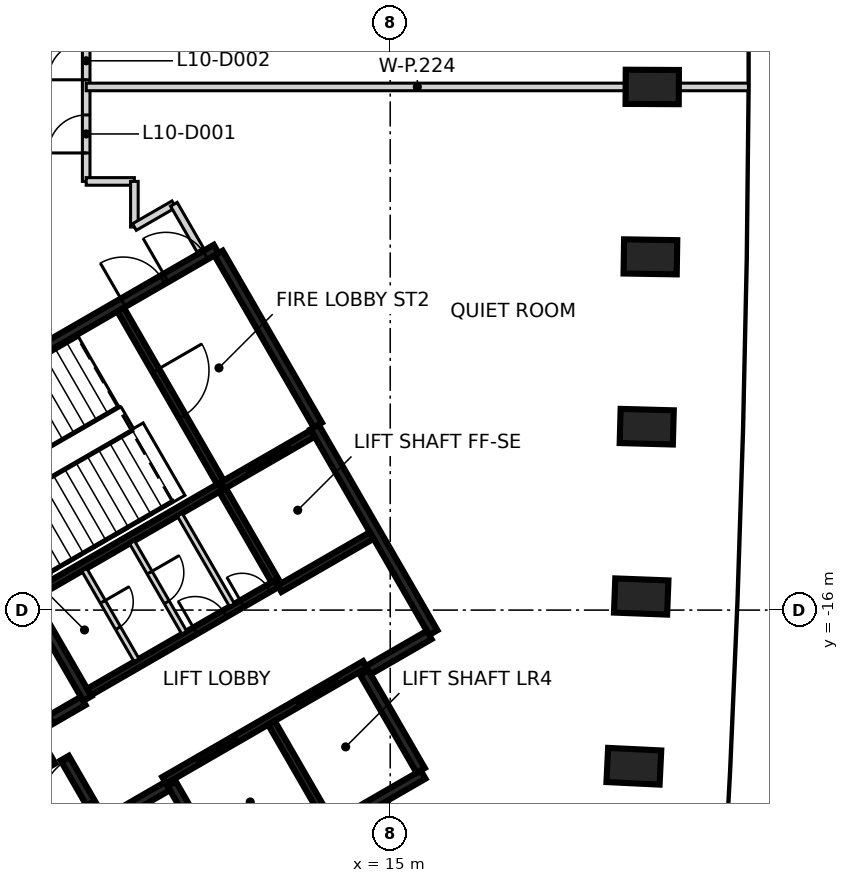
"""IFC4 building model, lengths in metres.
Left out: names, types, materials, properties, quantities, classifications, styles, units other than length and angle.
Written with IfcOpenShell. Run it as: python <this file> out.ifc"""

import sys

from ifc_helpers import new_model, si_unit, direction, frame, frame_2d, origin, origin_2d, place, context, subcontext, project, spatial, rectangle, extrude, element, fill, save


model = new_model("IFC4")
c1 = context("Model", 3, precision=1e-05, world=origin(), true_north=direction((0.0, 1.0)))
c2 = subcontext(c1, "Body", "Model", "MODEL_VIEW")
j1 = project(units=[si_unit("LENGTHUNIT", "METRE"), si_unit("PLANEANGLEUNIT", "RADIAN")], contexts=[c1])
p1 = place(None, origin())
s1 = spatial("IfcSite", under=j1, at=p1, CompositionType="ELEMENT")
p2 = place(p1, origin())
s2 = spatial("IfcBuilding", under=s1, at=p2, CompositionType="ELEMENT")
p3 = place(p2, frame((0.0, 0.0, 49.4)))
s3 = spatial("IfcBuildingStorey", under=s2, at=p3, CompositionType="ELEMENT", Elevation=49.4)
for number, where, z_axis, x_axis in (
    (1, (21.41, -20.109, -0.475), (0.0, 0.0, 1.0), (-0.999, 0.048, 0.0)),
    (2, (21.604, -15.643, -0.475), (0.0, 0.0, 1.0), (-0.999, 0.038, 0.0)),
    (3, (21.749, -11.174, -0.475), (0.0, 0.0, 1.0), (-1.0, 0.027, 0.0)),
    (4, (21.846, -6.706, -0.475), (0.0, 0.0, 1.0), (-1.0, 0.016, 0.0)),
    (5, (21.894, -2.235, -0.475), (0.0, 0.0, 1.0), (-1.0, 0.005, 0.0)),
):
    element("IfcColumn", number, at=place(p3, frame(where, z_axis=z_axis, x_axis=x_axis)), inside=s3, PredefinedType="COLUMN", context=c2, shape_type="SweptSolid", body=[
        extrude(rectangle(XDim=1.4, YDim=0.9, at=origin_2d()), origin(), (0.0, 0.0, 1.0), 3.6),
    ])
p4 = place(p3, frame((0.417, -12.273, 0.0), z_axis=(0.0, 0.0, 1.0), x_axis=(0.866021906294, 0.500006057782, 0.0)))
e6 = element("IfcWall", 6, at=p4, inside=s3, PredefinedType="SHEAR", context=c2, shape_type="SweptSolid", body=[
    extrude(rectangle(XDim=11.55, YDim=0.25, at=frame_2d((5.775, 0.0))), origin(), (0.0, 0.0, 1.0), 3.125),
])
p5 = place(p4, frame((10.025, 0.0, 0.0)))
e7 = element("IfcOpeningElement", 7, at=p5, cuts=e6, PredefinedType="OPENING", context=c2, shape_type="SweptSolid", body=[
    extrude(rectangle(XDim=1.2, YDim=2.1, at=frame_2d((0.6, 1.05))), frame((0.0, 0.135, 0.0), z_axis=(0.0, -1.0, 0.0), x_axis=(1.0, 0.0, 0.0)), (0.0, 0.0, 1.0), 0.27),
])
p6 = place(p4, frame((8.725, 0.0, 0.0)))
e8 = element("IfcOpeningElement", 8, at=p6, cuts=e6, PredefinedType="OPENING", context=c2, shape_type="SweptSolid", body=[
    extrude(rectangle(XDim=1.2, YDim=2.1, at=frame_2d((0.6, 1.05))), frame((0.0, 0.135, 0.0), z_axis=(0.0, -1.0, 0.0), x_axis=(1.0, 0.0, 0.0)), (0.0, 0.0, 1.0), 0.27),
])
p7 = place(p3, frame((13.008, -11.181, 0.0), z_axis=(0.0, 0.0, 1.0), x_axis=(0.500004234368, -0.866022959057, 0.0)))
e9 = element("IfcWall", 9, at=p7, inside=s3, PredefinedType="SHEAR", context=c2, shape_type="SweptSolid", body=[
    extrude(rectangle(XDim=6.25, YDim=0.25, at=frame_2d((3.125, 0.0))), origin(), (0.0, 0.0, 1.0), 3.125),
])
p8 = place(p3, frame((15.865, -20.328, 0.0), z_axis=(0.0, 0.0, 1.0), x_axis=(-0.86602852612, -0.499994591916, 0.0)))
e10 = element("IfcWall", 10, at=p8, inside=s3, PredefinedType="SHEAR", context=c2, shape_type="SweptSolid", body=[
    extrude(rectangle(XDim=5.85, YDim=0.25, at=frame_2d((2.925, 0.0))), origin(), (0.0, 0.0, 1.0), 3.125),
])
p9 = place(p3, frame((10.483, -6.606, 0.0), z_axis=(0.0, 0.0, 1.0), x_axis=(0.49999885962, -0.866026062182, 0.0)))
e11 = element("IfcWall", 11, at=p9, inside=s3, PredefinedType="SHEAR", context=c2, shape_type="SweptSolid", body=[
    extrude(rectangle(XDim=5.225, YDim=0.25, at=frame_2d((2.612, 0.0))), origin(), (0.0, 0.0, 1.0), 3.125),
])
p10 = place(p3, frame((7.031, -18.327, 0.0), z_axis=(0.0, 0.0, 1.0), x_axis=(-0.499971222258, 0.866042017984, 0.0)))
e12 = element("IfcWall", 12, at=p10, inside=s3, PredefinedType="SHEAR", context=c2, shape_type="SweptSolid", body=[
    extrude(rectangle(XDim=3.2, YDim=0.25, at=frame_2d((1.6, 0.0))), origin(), (0.0, 0.0, 1.0), 3.125),
])
for number, where, z_axis, x_axis in (
    (13, (14.315, -17.644, 0.0), (0.0, 0.0, 1.0), (0.5, -0.866, 0.0)),
    (14, (10.736, -23.145, 0.0), (0.0, 0.0, 1.0), (-0.5, 0.866, 0.0)),
):
    element("IfcWall", number, at=place(p3, frame(where, z_axis=z_axis, x_axis=x_axis)), inside=s3, PredefinedType="SHEAR", context=c2, shape_type="SweptSolid", body=[
        extrude(rectangle(XDim=2.974, YDim=0.25, at=frame_2d((1.487, 0.0))), origin(), (0.0, 0.0, 1.0), 3.125),
    ])
p11 = place(p3, frame((9.14, -20.631, 0.0), z_axis=(0.0, 0.0, 1.0), x_axis=(-0.866043531843, -0.499968599967, 0.0)))
e15 = element("IfcWall", 15, at=p11, inside=s3, PredefinedType="SHEAR", context=c2, shape_type="SweptSolid", body=[
    extrude(rectangle(XDim=1.975, YDim=0.25, at=frame_2d((0.987, 0.0))), origin(), (0.0, 0.0, 1.0), 3.125),
])
p12 = place(p3, frame((16.025, -16.656, 0.0), z_axis=(0.0, 0.0, 1.0), x_axis=(-0.866016279763, -0.500015802937, 0.0)))
e16 = element("IfcWall", 16, at=p12, inside=s3, PredefinedType="SHEAR", context=c2, shape_type="SweptSolid", body=[
    extrude(rectangle(XDim=1.849, YDim=0.25, at=frame_2d((0.925, 0.0))), origin(), (0.0, 0.0, 1.0), 3.125),
])
p13 = place(p3, frame((7.367, -21.51, 0.0), z_axis=(0.0, 0.0, 1.0), x_axis=(-0.499983108224, 0.866035156036, 0.0)))
e17 = element("IfcWall", 17, at=p13, inside=s3, PredefinedType="SHEAR", context=c2, shape_type="SweptSolid", body=[
    extrude(rectangle(XDim=1.865, YDim=0.25, at=frame_2d((0.932, 0.0))), origin(), (0.0, 0.0, 1.0), 3.125),
])
p14 = place(p13, frame((0.535, 0.0, 0.0)))
e18 = element("IfcOpeningElement", 18, at=p14, cuts=e17, PredefinedType="OPENING", context=c2, shape_type="SweptSolid", body=[
    extrude(rectangle(XDim=1.25, YDim=2.1, at=frame_2d((0.625, 1.05))), frame((0.0, 0.135, 0.0), z_axis=(0.0, -1.0, 0.0), x_axis=(1.0, 0.0, 0.0)), (0.0, 0.0, 1.0), 0.27),
])
p15 = place(p3, frame((6.065, -18.885, 0.0), z_axis=(0.0, 0.0, 1.0), x_axis=(0.866017078145, 0.500014420154, 0.0)))
e19 = element("IfcWall", 19, at=p15, inside=s3, PredefinedType="SHEAR", context=c2, shape_type="SweptSolid", body=[
    extrude(rectangle(XDim=0.989, YDim=0.25, at=frame_2d((0.495, 0.0))), origin(), (0.0, 0.0, 1.0), 3.125),
])
p16 = place(p3, frame((6.08, -20.1, 0.0), z_axis=(0.0, 0.0, 1.0), x_axis=(-0.500051773299, 0.865995510393, 0.0)))
e20 = element("IfcWall", 20, at=p16, inside=s3, PredefinedType="SHEAR", context=c2, shape_type="SweptSolid", body=[
    extrude(rectangle(XDim=0.685, YDim=0.25, at=frame_2d((0.342, 0.0))), origin(), (0.0, 0.0, 1.0), 3.125),
])
p17 = place(p3, frame((9.052, -20.48, 0.0), z_axis=(0.0, 0.0, 1.0), x_axis=(0.866030299012, 0.499991521122, 0.0)))
e21 = element("IfcWall", 21, at=p17, inside=s3, PredefinedType="SHEAR", context=c2, shape_type="SweptSolid", body=[
    extrude(rectangle(XDim=6.1, YDim=0.2, at=frame_2d((3.05, 0.0))), origin(), (0.0, 0.0, 1.0), 3.125),
])
p18 = place(p17, frame((1.0, 0.0, 0.0)))
e22 = element("IfcOpeningElement", 22, at=p18, cuts=e21, PredefinedType="OPENING", context=c2, shape_type="SweptSolid", body=[
    extrude(rectangle(XDim=1.2, YDim=2.1, at=frame_2d((0.6, 1.05))), frame((0.0, 0.11, 0.0), z_axis=(0.0, -1.0, 0.0), x_axis=(1.0, 0.0, 0.0)), (0.0, 0.0, 1.0), 0.22),
])
p19 = place(p17, frame((4.05, 0.0, 0.0)))
e23 = element("IfcOpeningElement", 23, at=p19, cuts=e21, PredefinedType="OPENING", context=c2, shape_type="SweptSolid", body=[
    extrude(rectangle(XDim=1.2, YDim=2.1, at=frame_2d((0.6, 1.05))), frame((0.0, 0.11, 0.0), z_axis=(0.0, -1.0, 0.0), x_axis=(1.0, 0.0, 0.0)), (0.0, 0.0, 1.0), 0.22),
])
p20 = place(p3, frame((10.538, -12.752, 0.0), z_axis=(0.0, 0.0, 1.0), x_axis=(-0.866038630372, -0.499977090179, 0.0)))
e24 = element("IfcWall", 24, at=p20, inside=s3, PredefinedType="SHEAR", context=c2, shape_type="SweptSolid", body=[
    extrude(rectangle(XDim=5.699, YDim=0.2, at=frame_2d((2.85, 0.0))), origin(), (0.0, 0.0, 1.0), 3.125),
])
p21 = place(p3, frame((7.077, -18.156, 0.0), z_axis=(0.0, 0.0, 1.0), x_axis=(0.866038630372, 0.499977090179, 0.0)))
e25 = element("IfcWall", 25, at=p21, inside=s3, PredefinedType="SHEAR", context=c2, shape_type="SweptSolid", body=[
    extrude(rectangle(XDim=5.699, YDim=0.2, at=frame_2d((2.85, 0.0))), origin(), (0.0, 0.0, 1.0), 3.125),
])
p22 = place(p21, frame((3.224, 0.0, 0.0)))
e26 = element("IfcOpeningElement", 26, at=p22, cuts=e25, PredefinedType="OPENING", context=c2, shape_type="SweptSolid", body=[
    extrude(rectangle(XDim=0.9, YDim=2.1, at=frame_2d((0.45, 1.05))), frame((0.0, 0.11, 0.0), z_axis=(0.0, -1.0, 0.0), x_axis=(1.0, 0.0, 0.0)), (0.0, 0.0, 1.0), 0.22),
])
p23 = place(p21, frame((4.649, 0.0, 0.0)))
e27 = element("IfcOpeningElement", 27, at=p23, cuts=e25, PredefinedType="OPENING", context=c2, shape_type="SweptSolid", body=[
    extrude(rectangle(XDim=0.8, YDim=2.1, at=frame_2d((0.4, 1.05))), frame((0.0, 0.11, 0.0), z_axis=(0.0, -1.0, 0.0), x_axis=(1.0, 0.0, 0.0)), (0.0, 0.0, 1.0), 0.22),
])
p24 = place(p3, frame((7.906, -8.094, 0.0), z_axis=(0.0, 0.0, 1.0), x_axis=(0.500024287448, -0.866011380966, 0.0)))
e28 = element("IfcWall", 28, at=p24, inside=s3, PredefinedType="SHEAR", context=c2, shape_type="SweptSolid", body=[
    extrude(rectangle(XDim=5.251, YDim=0.2, at=frame_2d((2.625, 0.0))), origin(), (0.0, 0.0, 1.0), 3.125),
])
p25 = place(p24, frame((1.849, 0.0, 0.0)))
e29 = element("IfcOpeningElement", 29, at=p25, cuts=e28, PredefinedType="OPENING", context=c2, shape_type="SweptSolid", body=[
    extrude(rectangle(XDim=1.4, YDim=2.1, at=frame_2d((0.7, 1.05))), frame((0.0, 0.11, 0.0), z_axis=(0.0, -1.0, 0.0), x_axis=(1.0, 0.0, 0.0)), (0.0, 0.0, 1.0), 0.22),
])
p26 = place(p3, frame((11.875, -18.967, 0.0), z_axis=(0.0, 0.0, 1.0), x_axis=(0.49998131003, -0.866036194175, 0.0)))
e30 = element("IfcWall", 30, at=p26, inside=s3, PredefinedType="SHEAR", context=c2, shape_type="SweptSolid", body=[
    extrude(rectangle(XDim=3.048, YDim=0.2, at=frame_2d((1.524, 0.0))), origin(), (0.0, 0.0, 1.0), 3.125),
])
p27 = place(p3, frame((11.963, -15.22, 0.0), z_axis=(0.0, 0.0, 1.0), x_axis=(-0.500034990121, 0.866005201286, 0.0)))
e31 = element("IfcWall", 31, at=p27, inside=s3, PredefinedType="SHEAR", context=c2, shape_type="SweptSolid", body=[
    extrude(rectangle(XDim=2.75, YDim=0.2, at=frame_2d((1.375, 0.0))), origin(), (0.0, 0.0, 1.0), 3.125),
])
p28 = place(p3, frame((10.587, -12.723, 0.0), z_axis=(0.0, 0.0, 1.0), x_axis=(0.866037306777, 0.499979382845, 0.0)))
e32 = element("IfcWall", 32, at=p28, inside=s3, PredefinedType="SHEAR", context=c2, shape_type="SweptSolid", body=[
    extrude(rectangle(XDim=2.742, YDim=0.2, at=frame_2d((1.371, 0.0))), origin(), (0.0, 0.0, 1.0), 3.125),
])
p29 = place(p28, frame((0.743, 0.0, 0.0)))
e33 = element("IfcOpeningElement", 33, at=p29, cuts=e32, PredefinedType="OPENING", context=c2, shape_type="SweptSolid", body=[
    extrude(rectangle(XDim=1.3, YDim=2.1, at=frame_2d((0.65, 1.05))), frame((0.0, 0.11, 0.0), z_axis=(0.0, -1.0, 0.0), x_axis=(1.0, 0.0, 0.0)), (0.0, 0.0, 1.0), 0.22),
])
p30 = place(p3, frame((14.512, -14.037, 0.0), z_axis=(0.0, 0.0, 1.0), x_axis=(-0.866044696403, -0.499966582715, 0.0)))
e34 = element("IfcWall", 34, at=p30, inside=s3, PredefinedType="SHEAR", context=c2, shape_type="SweptSolid", body=[
    extrude(rectangle(XDim=2.799, YDim=0.2, at=frame_2d((1.399, 0.0))), origin(), (0.0, 0.0, 1.0), 3.125),
])
p31 = place(p3, frame((8.207, -14.214, 0.0), z_axis=(0.0, 0.0, 1.0), x_axis=(0.50002746344, -0.86600954718, 0.0)))
e35 = element("IfcWall", 35, at=p31, inside=s3, PredefinedType="PARTITIONING", context=c2, shape_type="SweptSolid", body=[
    extrude(rectangle(XDim=2.748, YDim=0.15, at=frame_2d((1.374, 0.0))), origin(), (0.0, 0.0, 1.0), 3.125),
])
p32 = place(p31, frame((0.924, 0.0, 0.0)))
e36 = element("IfcOpeningElement", 36, at=p32, cuts=e35, PredefinedType="OPENING", context=c2, shape_type="SweptSolid", body=[
    extrude(rectangle(XDim=0.9, YDim=2.1, at=frame_2d((0.45, 1.05))), frame((0.0, 0.085, 0.0), z_axis=(0.0, -1.0, 0.0), x_axis=(1.0, 0.0, 0.0)), (0.0, 0.0, 1.0), 0.17),
])
p33 = place(p3, frame((9.462, -13.489, 0.0), z_axis=(0.0, 0.0, 1.0), x_axis=(0.499988999718, -0.866031754707, 0.0)))
e37 = element("IfcWall", 37, at=p33, inside=s3, PredefinedType="PARTITIONING", context=c2, shape_type="SweptSolid", body=[
    extrude(rectangle(XDim=2.749, YDim=0.15, at=frame_2d((1.374, 0.0))), origin(), (0.0, 0.0, 1.0), 3.125),
])
p34 = place(p3, frame((6.951, -14.939, 0.0), z_axis=(0.0, 0.0, 1.0), x_axis=(0.499988999718, -0.866031754707, 0.0)))
e38 = element("IfcWall", 38, at=p34, inside=s3, PredefinedType="PARTITIONING", context=c2, shape_type="SweptSolid", body=[
    extrude(rectangle(XDim=2.749, YDim=0.15, at=frame_2d((1.374, 0.0))), origin(), (0.0, 0.0, 1.0), 3.125),
])
p35 = place(p34, frame((0.974, 0.0, 0.0)))
e39 = element("IfcOpeningElement", 39, at=p35, cuts=e38, PredefinedType="OPENING", context=c2, shape_type="SweptSolid", body=[
    extrude(rectangle(XDim=0.8, YDim=2.1, at=frame_2d((0.4, 1.05))), frame((0.0, 0.085, 0.0), z_axis=(0.0, -1.0, 0.0), x_axis=(1.0, 0.0, 0.0)), (0.0, 0.0, 1.0), 0.17),
])
p36 = place(p3, frame((7.0, -4.721, 0.0), z_axis=(0.0, 0.0, 1.0), x_axis=(0.0, 1.0, 0.0)))
e40 = element("IfcWall", 40, at=p36, inside=s3, PredefinedType="PARTITIONING", context=c2, shape_type="SweptSolid", body=[
    extrude(rectangle(XDim=8.799, YDim=0.2, at=frame_2d((4.399, 0.0))), origin(), (0.0, 0.0, 1.0), 3.125),
])
p37 = place(p36, frame((0.749, 0.0, 0.0)))
e41 = element("IfcOpeningElement", 41, at=p37, cuts=e40, PredefinedType="OPENING", context=c2, shape_type="SweptSolid", body=[
    extrude(rectangle(XDim=1.0, YDim=2.1, at=frame_2d((0.5, 1.05))), frame((0.0, 0.11, 0.0), z_axis=(0.0, -1.0, 0.0), x_axis=(1.0, 0.0, 0.0)), (0.0, 0.0, 1.0), 0.22),
])
p38 = place(p36, frame((2.674, 0.0, 0.0)))
e42 = element("IfcOpeningElement", 42, at=p38, cuts=e40, PredefinedType="OPENING", context=c2, shape_type="SweptSolid", body=[
    extrude(rectangle(XDim=1.0, YDim=2.1, at=frame_2d((0.5, 1.05))), frame((0.0, 0.11, 0.0), z_axis=(0.0, -1.0, 0.0), x_axis=(1.0, 0.0, 0.0)), (0.0, 0.0, 1.0), 0.22),
])
p39 = place(p3, frame((7.0, -4.721, 0.0), z_axis=(0.0, 0.0, 1.0), x_axis=(1.0, 0.0, 0.0)))
e43 = element("IfcWall", 43, at=p39, inside=s3, PredefinedType="PARTITIONING", context=c2, shape_type="SweptSolid", body=[
    extrude(rectangle(XDim=1.268, YDim=0.2, at=frame_2d((0.634, 0.0))), origin(), (0.0, 0.0, 1.0), 3.125),
])
p40 = place(p3, frame((8.268, -5.921, 0.0), z_axis=(0.0, 0.0, 1.0), x_axis=(0.0, 1.0, 0.0)))
e44 = element("IfcWall", 44, at=p40, inside=s3, PredefinedType="PARTITIONING", context=c2, shape_type="SweptSolid", body=[
    extrude(rectangle(XDim=1.2, YDim=0.2, at=frame_2d((0.6, 0.0))), origin(), (0.0, 0.0, 1.0), 3.125),
])
p41 = place(p3, frame((8.268, -5.921, 0.0), z_axis=(0.0, 0.0, 1.0), x_axis=(0.866344856625, 0.499446282797, 0.0)))
e45 = element("IfcWall", 45, at=p41, inside=s3, PredefinedType="PARTITIONING", context=c2, shape_type="SweptSolid", body=[
    extrude(rectangle(XDim=1.199, YDim=0.2, at=frame_2d((0.6, 0.0))), origin(), (0.0, 0.0, 1.0), 3.125),
])
p42 = place(p3, frame((9.307, -5.322, 0.0), z_axis=(0.0, 0.0, 1.0), x_axis=(0.500295157811, -0.865854927266, 0.0)))
e46 = element("IfcWall", 46, at=p42, inside=s3, PredefinedType="PARTITIONING", context=c2, shape_type="SweptSolid", body=[
    extrude(rectangle(XDim=1.39, YDim=0.2, at=frame_2d((0.695, 0.0))), origin(), (0.0, 0.0, 1.0), 3.125),
])
p43 = place(p3, frame((7.001, -2.235, 0.0), z_axis=(0.0, 0.0, 1.0), x_axis=(1.0, 0.0, 0.0)))
e47 = element("IfcWall", 47, at=p43, inside=s3, PredefinedType="PARTITIONING", context=c2, shape_type="SweptSolid", body=[
    extrude(rectangle(XDim=17.424, YDim=0.2, at=frame_2d((8.712, 0.0))), origin(), (0.0, 0.0, 1.0), 3.125),
])
p44 = place(p29, origin())
e48 = element("IfcDoor", 48, at=p44, inside=s3, OperationType="SLIDING_TO_LEFT", PredefinedType="DOOR", context=c2, shape_type="SweptSolid", body=[
    extrude(rectangle(XDim=1.3, YDim=2.1, at=frame_2d((0.65, 1.05))), frame((0.0, 0.025, 0.0), z_axis=(0.0, -1.0, 0.0), x_axis=(1.0, 0.0, 0.0)), (0.0, 0.0, 1.0), 0.05),
])
fill(e33, e48)
p45 = place(p18, origin())
e49 = element("IfcDoor", 49, at=p45, inside=s3, OperationType="DOUBLE_DOOR_SLIDING", PredefinedType="DOOR", context=c2, shape_type="SweptSolid", body=[
    extrude(rectangle(XDim=1.2, YDim=2.1, at=frame_2d((0.6, 1.05))), frame((0.0, 0.025, 0.0), z_axis=(0.0, -1.0, 0.0), x_axis=(1.0, 0.0, 0.0)), (0.0, 0.0, 1.0), 0.05),
])
fill(e22, e49)
p46 = place(p19, origin())
e50 = element("IfcDoor", 50, at=p46, inside=s3, OperationType="DOUBLE_DOOR_SLIDING", PredefinedType="DOOR", context=c2, shape_type="SweptSolid", body=[
    extrude(rectangle(XDim=1.2, YDim=2.1, at=frame_2d((0.6, 1.05))), frame((0.0, 0.025, 0.0), z_axis=(0.0, -1.0, 0.0), x_axis=(1.0, 0.0, 0.0)), (0.0, 0.0, 1.0), 0.05),
])
fill(e23, e50)
p47 = place(p14, origin())
e51 = element("IfcDoor", 51, at=p47, inside=s3, OperationType="SINGLE_SWING_LEFT", PredefinedType="DOOR", context=c2, shape_type="SweptSolid", body=[
    extrude(rectangle(XDim=1.25, YDim=2.1, at=frame_2d((0.625, 1.05))), frame((0.0, 0.025, 0.0), z_axis=(0.0, -1.0, 0.0), x_axis=(1.0, 0.0, 0.0)), (0.0, 0.0, 1.0), 0.05),
])
fill(e18, e51)
p48 = place(p5, origin())
e52 = element("IfcDoor", 52, at=p48, inside=s3, OperationType="SINGLE_SWING_LEFT", PredefinedType="DOOR", context=c2, shape_type="SweptSolid", body=[
    extrude(rectangle(XDim=1.2, YDim=2.1, at=frame_2d((0.6, 1.05))), frame((0.0, 0.025, 0.0), z_axis=(0.0, -1.0, 0.0), x_axis=(1.0, 0.0, 0.0)), (0.0, 0.0, 1.0), 0.05),
])
fill(e7, e52)
p49 = place(p6, origin())
e53 = element("IfcDoor", 53, at=p49, inside=s3, OperationType="SINGLE_SWING_RIGHT", PredefinedType="DOOR", context=c2, shape_type="SweptSolid", body=[
    extrude(rectangle(XDim=1.2, YDim=2.1, at=frame_2d((0.6, 1.05))), frame((0.0, 0.025, 0.0), z_axis=(0.0, -1.0, 0.0), x_axis=(1.0, 0.0, 0.0)), (0.0, 0.0, 1.0), 0.05),
])
fill(e8, e53)
p50 = place(p25, origin())
e54 = element("IfcDoor", 54, at=p50, inside=s3, OperationType="SINGLE_SWING_LEFT", PredefinedType="DOOR", context=c2, shape_type="SweptSolid", body=[
    extrude(rectangle(XDim=1.4, YDim=2.1, at=frame_2d((0.7, 1.05))), frame((0.0, 0.025, 0.0), z_axis=(0.0, -1.0, 0.0), x_axis=(1.0, 0.0, 0.0)), (0.0, 0.0, 1.0), 0.05),
])
fill(e29, e54)
p51 = place(p22, origin())
e55 = element("IfcDoor", 55, at=p51, inside=s3, OperationType="SINGLE_SWING_RIGHT", PredefinedType="DOOR", context=c2, shape_type="SweptSolid", body=[
    extrude(rectangle(XDim=0.9, YDim=2.1, at=frame_2d((0.45, 1.05))), frame((0.0, 0.025, 0.0), z_axis=(0.0, -1.0, 0.0), x_axis=(1.0, 0.0, 0.0)), (0.0, 0.0, 1.0), 0.05),
])
fill(e26, e55)
p52 = place(p23, origin())
e56 = element("IfcDoor", 56, at=p52, inside=s3, OperationType="SINGLE_SWING_LEFT", PredefinedType="DOOR", context=c2, shape_type="SweptSolid", body=[
    extrude(rectangle(XDim=0.8, YDim=2.1, at=frame_2d((0.4, 1.05))), frame((0.0, 0.025, 0.0), z_axis=(0.0, -1.0, 0.0), x_axis=(1.0, 0.0, 0.0)), (0.0, 0.0, 1.0), 0.05),
])
fill(e27, e56)
p53 = place(p32, origin())
e57 = element("IfcDoor", 57, at=p53, inside=s3, OperationType="SINGLE_SWING_LEFT", PredefinedType="DOOR", context=c2, shape_type="SweptSolid", body=[
    extrude(rectangle(XDim=0.9, YDim=2.1, at=frame_2d((0.45, 1.05))), frame((0.0, 0.025, 0.0), z_axis=(0.0, -1.0, 0.0), x_axis=(1.0, 0.0, 0.0)), (0.0, 0.0, 1.0), 0.05),
])
fill(e36, e57)
p54 = place(p35, origin())
e58 = element("IfcDoor", 58, at=p54, inside=s3, OperationType="SINGLE_SWING_RIGHT", PredefinedType="DOOR", context=c2, shape_type="SweptSolid", body=[
    extrude(rectangle(XDim=0.8, YDim=2.1, at=frame_2d((0.4, 1.05))), frame((0.0, 0.025, 0.0), z_axis=(0.0, -1.0, 0.0), x_axis=(1.0, 0.0, 0.0)), (0.0, 0.0, 1.0), 0.05),
])
fill(e39, e58)
p55 = place(p37, frame((1.0, 0.0, 0.0), z_axis=(0.0, 0.0, 1.0), x_axis=(-1.0, 0.0, 0.0)))
e59 = element("IfcDoor", 59, at=p55, inside=s3, OperationType="SINGLE_SWING_LEFT", PredefinedType="DOOR", context=c2, shape_type="SweptSolid", body=[
    extrude(rectangle(XDim=1.0, YDim=2.1, at=frame_2d((0.5, 1.05))), frame((0.0, 0.025, 0.0), z_axis=(0.0, -1.0, 0.0), x_axis=(1.0, 0.0, 0.0)), (0.0, 0.0, 1.0), 0.05),
])
fill(e41, e59)
p56 = place(p38, frame((1.0, 0.0, 0.0), z_axis=(0.0, 0.0, 1.0), x_axis=(-1.0, 0.0, 0.0)))
e60 = element("IfcDoor", 60, at=p56, inside=s3, OperationType="SINGLE_SWING_LEFT", PredefinedType="DOOR", context=c2, shape_type="SweptSolid", body=[
    extrude(rectangle(XDim=1.0, YDim=2.1, at=frame_2d((0.5, 1.05))), frame((0.0, 0.025, 0.0), z_axis=(0.0, -1.0, 0.0), x_axis=(1.0, 0.0, 0.0)), (0.0, 0.0, 1.0), 0.05),
])
fill(e42, e60)
save(model, sys.argv[1])
